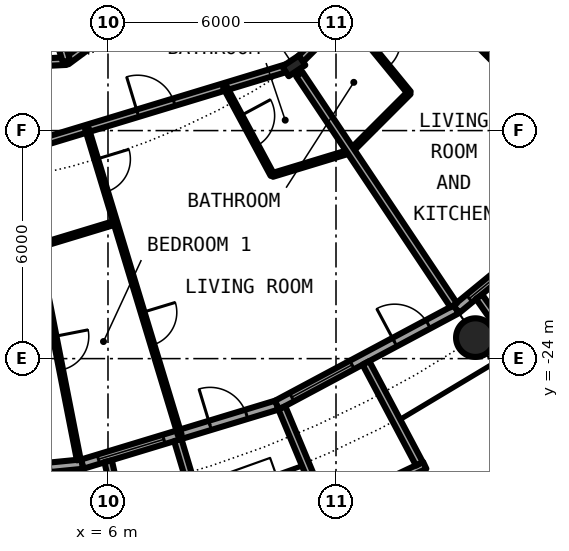
"""IFC4 building model, lengths in metres.
Left out: names, types, materials, properties, quantities, classifications, styles, units other than length and angle.
Written with IfcOpenShell. Run it as: python <this file> out.ifc"""

import sys

from ifc_helpers import new_model, si_unit, direction, frame, frame_2d, origin, origin_2d, place, context, subcontext, project, spatial, rectangle, circle, hollow_circle, i_section, extrude, element, fill, save


model = new_model("IFC4")
c1 = context("Model", 3, precision=1e-05, world=origin(), true_north=direction((0.0, 1.0)))
c2 = subcontext(c1, "Body", "Model", "MODEL_VIEW")
j1 = project(units=[si_unit("LENGTHUNIT", "METRE"), si_unit("PLANEANGLEUNIT", "RADIAN")], contexts=[c1])
p1 = place(None, origin())
s1 = spatial("IfcSite", under=j1, at=p1, CompositionType="ELEMENT")
p2 = place(p1, origin())
s2 = spatial("IfcBuilding", under=s1, at=p2, CompositionType="ELEMENT")
p3 = place(p2, frame((0.0, 0.0, 91.05)))
s3 = spatial("IfcBuildingStorey", under=s2, at=p3, CompositionType="ELEMENT", Elevation=91.05)
p4 = place(p3, frame((15.667, -23.448, 0.0), z_axis=(0.0, 0.0, 1.0), x_axis=(1.0, 0.0, 0.0)))
e1 = element("IfcColumn", 1, at=p4, inside=s3, PredefinedType="COLUMN", context=c2, shape_type="SweptSolid", body=[
    extrude(hollow_circle(Radius=0.508, WallThickness=0.04, at=origin_2d()), origin(), (0.0, 0.0, 1.0), 3.05),
])
p5 = place(p3, frame((10.889, -16.297, 0.0), z_axis=(0.0, 0.0, 1.0), x_axis=(0.55557023302, -0.831469612303, 0.0)))
e2 = element("IfcColumn", 2, at=p5, inside=s3, PredefinedType="COLUMN", context=c2, shape_type="SweptSolid", body=[
    extrude(i_section(OverallWidth=0.306, OverallDepth=0.524, WebThickness=0.021, FlangeThickness=0.04, FilletRadius=0.027, at=origin_2d()), origin(), (0.0, 0.0, 1.0), 3.05),
])
p6 = place(p3, frame((0.0, -27.3, 0.0), z_axis=(0.0, 0.0, 1.0), x_axis=(0.995173996315, 0.098126026407, 0.0)))
e3 = element("IfcWall", 3, at=p6, inside=s3, PredefinedType="SOLIDWALL", context=c2, shape_type="SweptSolid", body=[
    extrude(rectangle(XDim=5.352, YDim=0.25, at=frame_2d((2.676, 0.0))), origin(), (0.0, 0.0, 1.0), 2.7),
])
p7 = place(p6, frame((0.441, 0.0, 0.3)))
e4 = element("IfcOpeningElement", 4, at=p7, cuts=e3, PredefinedType="OPENING", context=c2, shape_type="SweptSolid", body=[
    extrude(rectangle(XDim=1.8, YDim=2.1, at=frame_2d((0.9, 1.05))), frame((0.0, 0.135, 0.0), z_axis=(0.0, -1.0, 0.0), x_axis=(1.0, 0.0, 0.0)), (0.0, 0.0, 1.0), 0.27),
])
p8 = place(p6, frame((3.51, 0.0, 0.0)))
e5 = element("IfcOpeningElement", 5, at=p8, cuts=e3, PredefinedType="OPENING", context=c2, shape_type="SweptSolid", body=[
    extrude(rectangle(XDim=1.0, YDim=2.2, at=frame_2d((0.5, 1.1))), frame((0.0, 0.135, 0.0), z_axis=(0.0, -1.0, 0.0), x_axis=(1.0, 0.0, 0.0)), (0.0, 0.0, 1.0), 0.27),
])
p9 = place(p3, frame((5.326, -26.775, 0.0), z_axis=(0.0, 0.0, 1.0), x_axis=(0.956965678721, 0.290201119486, 0.0)))
e6 = element("IfcWall", 6, at=p9, inside=s3, PredefinedType="SOLIDWALL", context=c2, shape_type="SweptSolid", body=[
    extrude(rectangle(XDim=5.351, YDim=0.25, at=frame_2d((2.676, 0.0))), origin(), (0.0, 0.0, 1.0), 2.7),
])
p10 = place(p9, frame((0.441, 0.0, 0.3)))
e7 = element("IfcOpeningElement", 7, at=p10, cuts=e6, PredefinedType="OPENING", context=c2, shape_type="SweptSolid", body=[
    extrude(rectangle(XDim=1.8, YDim=2.1, at=frame_2d((0.9, 1.05))), frame((0.0, 0.135, 0.0), z_axis=(0.0, -1.0, 0.0), x_axis=(1.0, 0.0, 0.0)), (0.0, 0.0, 1.0), 0.27),
])
p11 = place(p9, frame((3.51, 0.0, 0.0)))
e8 = element("IfcOpeningElement", 8, at=p11, cuts=e6, PredefinedType="OPENING", context=c2, shape_type="SweptSolid", body=[
    extrude(rectangle(XDim=1.0, YDim=2.2, at=frame_2d((0.5, 1.1))), frame((0.0, 0.135, 0.0), z_axis=(0.0, -1.0, 0.0), x_axis=(1.0, 0.0, 0.0)), (0.0, 0.0, 1.0), 0.27),
])
p12 = place(p3, frame((6.004, -26.7, -0.03), z_axis=(0.0, 0.0, 1.0), x_axis=(0.219609259383, -0.975587911566, 0.0)))
e9 = element("IfcWall", 9, at=p12, inside=s3, PredefinedType="SOLIDWALL", context=c2, shape_type="SweptSolid", body=[
    extrude(rectangle(XDim=2.933, YDim=0.2, at=frame_2d((1.466, 0.0))), origin(), (0.0, 0.0, 1.0), 2.73),
])
p13 = place(p3, frame((7.837, -26.144, -0.03), z_axis=(0.0, 0.0, 1.0), x_axis=(0.287064767992, -0.957911174889, 0.0)))
e10 = element("IfcWall", 10, at=p13, inside=s3, PredefinedType="SOLIDWALL", context=c2, shape_type="SweptSolid", body=[
    extrude(rectangle(XDim=3.006, YDim=0.2, at=frame_2d((1.503, 0.0))), origin(), (0.0, 0.0, 1.0), 2.73),
])
p14 = place(p3, frame((10.447, -25.222, 0.0), z_axis=(0.0, 0.0, 1.0), x_axis=(0.881915646801, 0.471407246368, 0.0)))
e11 = element("IfcWall", 11, at=p14, inside=s3, PredefinedType="SOLIDWALL", context=c2, shape_type="SweptSolid", body=[
    extrude(rectangle(XDim=5.352, YDim=0.25, at=frame_2d((2.676, 0.0))), origin(), (0.0, 0.0, 1.0), 2.7),
])
p15 = place(p14, frame((0.441, 0.0, 0.3)))
e12 = element("IfcOpeningElement", 12, at=p15, cuts=e11, PredefinedType="OPENING", context=c2, shape_type="SweptSolid", body=[
    extrude(rectangle(XDim=1.8, YDim=2.1, at=frame_2d((0.9, 1.05))), frame((0.0, 0.135, 0.0), z_axis=(0.0, -1.0, 0.0), x_axis=(1.0, 0.0, 0.0)), (0.0, 0.0, 1.0), 0.27),
])
p16 = place(p14, frame((3.51, 0.0, 0.0)))
e13 = element("IfcOpeningElement", 13, at=p16, cuts=e11, PredefinedType="OPENING", context=c2, shape_type="SweptSolid", body=[
    extrude(rectangle(XDim=1.0, YDim=2.2, at=frame_2d((0.5, 1.1))), frame((0.0, 0.135, 0.0), z_axis=(0.0, -1.0, 0.0), x_axis=(1.0, 0.0, 0.0)), (0.0, 0.0, 1.0), 0.27),
])
p17 = place(p3, frame((11.629, -28.088, -0.03), z_axis=(0.0, 0.0, 1.0), x_axis=(0.904000060331, 0.427532327342, 0.0)))
e14 = element("IfcWall", 14, at=p17, inside=s3, PredefinedType="SOLIDWALL", context=c2, shape_type="SweptSolid", body=[
    extrude(rectangle(XDim=2.993, YDim=0.2, at=frame_2d((1.497, 0.0))), origin(), (0.0, 0.0, 1.0), 2.73),
])
p18 = place(p17, frame((0.457, 0.0, 0.33)))
e15 = element("IfcOpeningElement", 15, at=p18, cuts=e14, PredefinedType="OPENING", context=c2, shape_type="SweptSolid", body=[
    extrude(circle(Radius=1.04, at=frame_2d((1.04, 1.04))), frame((0.0, 0.11, 0.0), z_axis=(0.0, -1.0, 0.0), x_axis=(1.0, 0.0, 0.0)), (0.0, 0.0, 1.0), 0.22),
])
p19 = place(p3, frame((10.575, -25.295, -0.03), z_axis=(0.0, 0.0, 1.0), x_axis=(0.385697364644, -0.922625353492, 0.0)))
e16 = element("IfcWall", 16, at=p19, inside=s3, PredefinedType="SOLIDWALL", context=c2, shape_type="SweptSolid", body=[
    extrude(rectangle(XDim=2.883, YDim=0.2, at=frame_2d((1.442, 0.0))), origin(), (0.0, 0.0, 1.0), 2.73),
])
p20 = place(p3, frame((12.787, -24.113, -0.03), z_axis=(0.0, 0.0, 1.0), x_axis=(0.468365282436, -0.883534924159, 0.0)))
e17 = element("IfcWall", 17, at=p20, inside=s3, PredefinedType="SOLIDWALL", context=c2, shape_type="SweptSolid", body=[
    extrude(rectangle(XDim=3.006, YDim=0.2, at=frame_2d((1.503, 0.0))), origin(), (0.0, 0.0, 1.0), 2.73),
])
p21 = place(p3, frame((15.167, -22.699, 0.0), z_axis=(0.0, 0.0, 1.0), x_axis=(0.773019449054, 0.634382322723, 0.0)))
e18 = element("IfcWall", 18, at=p21, inside=s3, PredefinedType="SOLIDWALL", context=c2, shape_type="SweptSolid", body=[
    extrude(rectangle(XDim=5.352, YDim=0.25, at=frame_2d((2.676, 0.0))), origin(), (0.0, 0.0, 1.0), 2.7),
])
p22 = place(p21, frame((0.441, 0.0, 0.3)))
e19 = element("IfcOpeningElement", 19, at=p22, cuts=e18, PredefinedType="OPENING", context=c2, shape_type="SweptSolid", body=[
    extrude(rectangle(XDim=1.8, YDim=2.1, at=frame_2d((0.9, 1.05))), frame((0.0, 0.135, 0.0), z_axis=(0.0, -1.0, 0.0), x_axis=(1.0, 0.0, 0.0)), (0.0, 0.0, 1.0), 0.27),
])
p23 = place(p21, frame((3.51, 0.0, 0.0)))
e20 = element("IfcOpeningElement", 20, at=p23, cuts=e18, PredefinedType="OPENING", context=c2, shape_type="SweptSolid", body=[
    extrude(rectangle(XDim=1.0, YDim=2.2, at=frame_2d((0.5, 1.1))), frame((0.0, 0.135, 0.0), z_axis=(0.0, -1.0, 0.0), x_axis=(1.0, 0.0, 0.0)), (0.0, 0.0, 1.0), 0.27),
])
p24 = place(p3, frame((15.765, -22.37, -0.03), z_axis=(0.0, 0.0, 1.0), x_axis=(0.576274612209, -0.817256123454, 0.0)))
e21 = element("IfcWall", 21, at=p24, inside=s3, PredefinedType="SOLIDWALL", context=c2, shape_type="SweptSolid", body=[
    extrude(rectangle(XDim=2.933, YDim=0.2, at=frame_2d((1.466, 0.0))), origin(), (0.0, 0.0, 1.0), 2.73),
])
p25 = place(p3, frame((12.389, -18.542, 0.0), z_axis=(0.0, 0.0, 1.0), x_axis=(0.707106781187, 0.707106781187, 0.0)))
e22 = element("IfcWall", 22, at=p25, inside=s3, PredefinedType="PARTITIONING", context=c2, shape_type="SweptSolid", body=[
    extrude(rectangle(XDim=2.175, YDim=0.1, at=frame_2d((1.088, 0.0))), origin(), (0.0, 0.0, 1.0), 2.7),
])
p26 = place(p3, frame((0.0, -22.3, 0.0), z_axis=(0.0, 0.0, 1.0), x_axis=(0.956940987612, 0.290282528286, 0.0)))
e23 = element("IfcWall", 23, at=p26, inside=s3, PredefinedType="PARTITIONING", context=c2, shape_type="SweptSolid", body=[
    extrude(rectangle(XDim=6.477, YDim=0.1, at=frame_2d((3.238, 0.0))), origin(), (0.0, 0.0, 1.0), 2.7),
])
p27 = place(p3, frame((10.327, -19.168, 0.0), z_axis=(0.0, 0.0, 1.0), x_axis=(0.956877769253, 0.290490851335, 0.0)))
e24 = element("IfcWall", 24, at=p27, inside=s3, PredefinedType="PARTITIONING", context=c2, shape_type="SweptSolid", body=[
    extrude(rectangle(XDim=2.158, YDim=0.1, at=frame_2d((1.079, 0.0))), origin(), (0.0, 0.0, 1.0), 2.7),
])
p28 = place(p3, frame((11.0, -16.186, 0.0), z_axis=(0.0, 0.0, 1.0), x_axis=(0.707106781187, 0.707106781187, 0.0)))
e25 = element("IfcWall", 25, at=p28, inside=s3, PredefinedType="PARTITIONING", context=c2, shape_type="SweptSolid", body=[
    extrude(rectangle(XDim=7.334, YDim=0.2, at=frame_2d((3.667, 0.0))), origin(), (0.0, 0.0, 1.0), 2.38),
])
p29 = place(p28, frame((4.123, 0.0, 0.0)))
e26 = element("IfcOpeningElement", 26, at=p29, cuts=e25, PredefinedType="OPENING", context=c2, shape_type="SweptSolid", body=[
    extrude(rectangle(XDim=1.0, YDim=2.3, at=frame_2d((0.5, 1.15))), frame((0.0, 0.11, 0.0), z_axis=(0.0, -1.0, 0.0), x_axis=(1.0, 0.0, 0.0)), (0.0, 0.0, 1.0), 0.22),
])
p30 = place(p3, frame((0.0, -19.6, 0.0), z_axis=(0.0, 0.0, 1.0), x_axis=(0.956932298225, 0.290311172044, 0.0)))
e27 = element("IfcWall", 27, at=p30, inside=s3, PredefinedType="PARTITIONING", context=c2, shape_type="SweptSolid", body=[
    extrude(rectangle(XDim=11.219, YDim=0.2, at=frame_2d((5.61, 0.0))), origin(), (0.0, 0.0, 1.0), 2.38),
])
p31 = place(p30, frame((7.086, 0.0, 0.0)))
e28 = element("IfcOpeningElement", 28, at=p31, cuts=e27, PredefinedType="OPENING", context=c2, shape_type="SweptSolid", body=[
    extrude(rectangle(XDim=1.0, YDim=2.3, at=frame_2d((0.5, 1.15))), frame((0.0, 0.11, 0.0), z_axis=(0.0, -1.0, 0.0), x_axis=(1.0, 0.0, 0.0)), (0.0, 0.0, 1.0), 0.22),
])
p32 = place(p3, frame((-3.297, -16.575, 0.0), z_axis=(0.0, 0.0, 1.0), x_axis=(0.998796706656, 0.0490422142, 0.0)))
e29 = element("IfcWall", 29, at=p32, inside=s3, PredefinedType="PARTITIONING", context=c2, shape_type="SweptSolid", body=[
    extrude(rectangle(XDim=8.214, YDim=0.2, at=frame_2d((4.107, 0.0))), origin(), (0.0, 0.0, 1.0), 2.7),
])
p33 = place(p32, frame((3.614, 0.0, 0.0)))
e30 = element("IfcOpeningElement", 30, at=p33, cuts=e29, PredefinedType="OPENING", context=c2, shape_type="SweptSolid", body=[
    extrude(rectangle(XDim=1.0, YDim=2.3, at=frame_2d((0.5, 1.15))), frame((0.0, 0.11, 0.0), z_axis=(0.0, -1.0, 0.0), x_axis=(1.0, 0.0, 0.0)), (0.0, 0.0, 1.0), 0.22),
])
p34 = place(p3, frame((4.906, -16.172, 0.0), z_axis=(0.0, 0.0, 1.0), x_axis=(0.803191461888, 0.595720971219, 0.0)))
e31 = element("IfcWall", 31, at=p34, inside=s3, PredefinedType="PARTITIONING", context=c2, shape_type="SweptSolid", body=[
    extrude(rectangle(XDim=9.76, YDim=0.2, at=frame_2d((4.88, 0.0))), origin(), (0.0, 0.0, 1.0), 2.7),
])
p35 = place(p34, frame((4.38, 0.0, 0.0)))
e32 = element("IfcOpeningElement", 32, at=p35, cuts=e31, PredefinedType="OPENING", context=c2, shape_type="SweptSolid", body=[
    extrude(rectangle(XDim=1.0, YDim=2.3, at=frame_2d((0.5, 1.15))), frame((0.0, 0.11, 0.0), z_axis=(0.0, -1.0, 0.0), x_axis=(1.0, 0.0, 0.0)), (0.0, 0.0, 1.0), 0.22),
])
p36 = place(p3, frame((2.242, -7.388, 0.0), z_axis=(0.0, 0.0, 1.0), x_axis=(0.290225889812, -0.956958166736, 0.0)))
e33 = element("IfcWall", 33, at=p36, inside=s3, PredefinedType="PARTITIONING", context=c2, shape_type="SweptSolid", body=[
    extrude(rectangle(XDim=9.179, YDim=0.2, at=frame_2d((4.59, 0.0))), origin(), (0.0, 0.0, 1.0), 2.7),
])
p37 = place(p3, frame((4.13, -21.047, 0.0), z_axis=(0.0, 0.0, 1.0), x_axis=(0.192433779325, -0.981309961518, 0.0)))
e34 = element("IfcWall", 34, at=p37, inside=s3, PredefinedType="PARTITIONING", context=c2, shape_type="SweptSolid", body=[
    extrude(rectangle(XDim=5.727, YDim=0.1, at=frame_2d((2.863, 0.0))), origin(), (0.0, 0.0, 1.0), 2.7),
])
p38 = place(p37, frame((2.414, 0.0, 0.0)))
e35 = element("IfcOpeningElement", 35, at=p38, cuts=e34, PredefinedType="OPENING", context=c2, shape_type="SweptSolid", body=[
    extrude(rectangle(XDim=0.9, YDim=2.3, at=frame_2d((0.45, 1.15))), frame((0.0, 0.06, 0.0), z_axis=(0.0, -1.0, 0.0), x_axis=(1.0, 0.0, 0.0)), (0.0, 0.0, 1.0), 0.12),
])
p39 = place(p3, frame((5.445, -17.948, 0.0), z_axis=(0.0, 0.0, 1.0), x_axis=(0.290158700753, -0.956978541231, 0.0)))
e36 = element("IfcWall", 36, at=p39, inside=s3, PredefinedType="PARTITIONING", context=c2, shape_type="SweptSolid", body=[
    extrude(rectangle(XDim=8.419, YDim=0.1, at=frame_2d((4.209, 0.0))), origin(), (0.0, 0.0, 1.0), 2.7),
])
p40 = place(p39, frame((0.842, 0.0, 0.0)))
e37 = element("IfcOpeningElement", 37, at=p40, cuts=e36, PredefinedType="OPENING", context=c2, shape_type="SweptSolid", body=[
    extrude(rectangle(XDim=0.9, YDim=2.3, at=frame_2d((0.45, 1.15))), frame((0.0, 0.06, 0.0), z_axis=(0.0, -1.0, 0.0), x_axis=(1.0, 0.0, 0.0)), (0.0, 0.0, 1.0), 0.12),
])
p41 = place(p39, frame((5.052, 0.0, 0.0)))
e38 = element("IfcOpeningElement", 38, at=p41, cuts=e36, PredefinedType="OPENING", context=c2, shape_type="SweptSolid", body=[
    extrude(rectangle(XDim=0.9, YDim=2.3, at=frame_2d((0.45, 1.15))), frame((0.0, 0.06, 0.0), z_axis=(0.0, -1.0, 0.0), x_axis=(1.0, 0.0, 0.0)), (0.0, 0.0, 1.0), 0.12),
])
p42 = place(p3, frame((9.074, -16.847, 0.0), z_axis=(0.0, 0.0, 1.0), x_axis=(0.474160570331, -0.880438387136, 0.0)))
e39 = element("IfcWall", 39, at=p42, inside=s3, PredefinedType="PARTITIONING", context=c2, shape_type="SweptSolid", body=[
    extrude(rectangle(XDim=2.636, YDim=0.1, at=frame_2d((1.318, 0.0))), origin(), (0.0, 0.0, 1.0), 2.7),
])
p43 = place(p42, frame((0.868, 0.0, 0.0)))
e40 = element("IfcOpeningElement", 40, at=p43, cuts=e39, PredefinedType="OPENING", context=c2, shape_type="SweptSolid", body=[
    extrude(rectangle(XDim=0.9, YDim=2.3, at=frame_2d((0.45, 1.15))), frame((0.0, 0.06, 0.0), z_axis=(0.0, -1.0, 0.0), x_axis=(1.0, 0.0, 0.0)), (0.0, 0.0, 1.0), 0.12),
])
p44 = place(p3, frame((11.034, -16.515, 0.0), z_axis=(0.0, 0.0, 1.0), x_axis=(0.555701298605, -0.831382022135, 0.0)))
e41 = element("IfcWall", 41, at=p44, inside=s3, PredefinedType="PARTITIONING", context=c2, shape_type="SweptSolid", body=[
    extrude(rectangle(XDim=7.313, YDim=0.2, at=frame_2d((3.657, 0.0))), origin(), (0.0, 0.0, 1.0), 2.7),
])
p45 = place(p3, frame((12.241, -14.945, 0.0), z_axis=(0.0, 0.0, 1.0), x_axis=(0.633582447834, -0.77367517848, 0.0)))
e42 = element("IfcWall", 42, at=p45, inside=s3, PredefinedType="PARTITIONING", context=c2, shape_type="SweptSolid", body=[
    extrude(rectangle(XDim=2.661, YDim=0.1, at=frame_2d((1.331, 0.0))), origin(), (0.0, 0.0, 1.0), 2.7),
])
p46 = place(p45, frame((0.881, 0.0, 0.0)))
e43 = element("IfcOpeningElement", 43, at=p46, cuts=e42, PredefinedType="OPENING", context=c2, shape_type="SweptSolid", body=[
    extrude(rectangle(XDim=0.9, YDim=2.3, at=frame_2d((0.45, 1.15))), frame((0.0, 0.06, 0.0), z_axis=(0.0, -1.0, 0.0), x_axis=(1.0, 0.0, 0.0)), (0.0, 0.0, 1.0), 0.12),
])
p47 = place(p3, frame((15.465, -15.465, 0.0), z_axis=(0.0, 0.0, 1.0), x_axis=(0.707106781187, -0.707106781187, 0.0)))
e44 = element("IfcWall", 44, at=p47, inside=s3, PredefinedType="PARTITIONING", context=c2, shape_type="SweptSolid", body=[
    extrude(rectangle(XDim=5.305, YDim=0.1, at=frame_2d((2.652, 0.0))), origin(), (0.0, 0.0, 1.0), 2.7),
])
p48 = place(p47, frame((2.202, 0.0, 0.0)))
e45 = element("IfcOpeningElement", 45, at=p48, cuts=e44, PredefinedType="OPENING", context=c2, shape_type="SweptSolid", body=[
    extrude(rectangle(XDim=0.9, YDim=2.3, at=frame_2d((0.45, 1.15))), frame((0.0, 0.06, 0.0), z_axis=(0.0, -1.0, 0.0), x_axis=(1.0, 0.0, 0.0)), (0.0, 0.0, 1.0), 0.12),
])
p49 = place(p10, origin())
e46 = element("IfcWindow", 46, at=p49, inside=s3, PartitioningType="SINGLE_PANEL", PredefinedType="WINDOW", context=c2, shape_type="SweptSolid", body=[
    extrude(rectangle(XDim=1.8, YDim=2.1, at=frame_2d((0.9, 1.05))), frame((0.0, 0.03, 0.0), z_axis=(0.0, -1.0, 0.0), x_axis=(1.0, 0.0, 0.0)), (0.0, 0.0, 1.0), 0.06),
])
fill(e7, e46)
p50 = place(p11, origin())
e47 = element("IfcDoor", 47, at=p50, inside=s3, OperationType="SINGLE_SWING_LEFT", PredefinedType="DOOR", context=c2, shape_type="SweptSolid", body=[
    extrude(rectangle(XDim=1.0, YDim=2.2, at=frame_2d((0.5, 1.1))), frame((0.0, 0.025, 0.0), z_axis=(0.0, -1.0, 0.0), x_axis=(1.0, 0.0, 0.0)), (0.0, 0.0, 1.0), 0.05),
])
fill(e8, e47)
p51 = place(p15, origin())
e48 = element("IfcWindow", 48, at=p51, inside=s3, PartitioningType="SINGLE_PANEL", PredefinedType="WINDOW", context=c2, shape_type="SweptSolid", body=[
    extrude(rectangle(XDim=1.8, YDim=2.1, at=frame_2d((0.9, 1.05))), frame((0.0, 0.03, 0.0), z_axis=(0.0, -1.0, 0.0), x_axis=(1.0, 0.0, 0.0)), (0.0, 0.0, 1.0), 0.06),
])
fill(e12, e48)
p52 = place(p18, origin())
e49 = element("IfcWindow", 49, at=p52, inside=s3, PartitioningType="SINGLE_PANEL", PredefinedType="WINDOW", context=c2, shape_type="SweptSolid", body=[
    extrude(circle(Radius=1.04, at=frame_2d((1.04, 1.04))), frame((0.0, 0.03, 0.0), z_axis=(0.0, -1.0, 0.0), x_axis=(1.0, 0.0, 0.0)), (0.0, 0.0, 1.0), 0.06),
])
fill(e15, e49)
p53 = place(p16, origin())
e50 = element("IfcDoor", 50, at=p53, inside=s3, OperationType="SINGLE_SWING_LEFT", PredefinedType="DOOR", context=c2, shape_type="SweptSolid", body=[
    extrude(rectangle(XDim=1.0, YDim=2.2, at=frame_2d((0.5, 1.1))), frame((0.0, 0.025, 0.0), z_axis=(0.0, -1.0, 0.0), x_axis=(1.0, 0.0, 0.0)), (0.0, 0.0, 1.0), 0.05),
])
fill(e13, e50)
p54 = place(p22, origin())
e51 = element("IfcWindow", 51, at=p54, inside=s3, PartitioningType="SINGLE_PANEL", PredefinedType="WINDOW", context=c2, shape_type="SweptSolid", body=[
    extrude(rectangle(XDim=1.8, YDim=2.1, at=frame_2d((0.9, 1.05))), frame((0.0, 0.03, 0.0), z_axis=(0.0, -1.0, 0.0), x_axis=(1.0, 0.0, 0.0)), (0.0, 0.0, 1.0), 0.06),
])
fill(e19, e51)
p55 = place(p31, origin())
e52 = element("IfcDoor", 52, at=p55, inside=s3, OperationType="SINGLE_SWING_RIGHT", PredefinedType="DOOR", context=c2, shape_type="SweptSolid", body=[
    extrude(rectangle(XDim=1.0, YDim=2.3, at=frame_2d((0.5, 1.15))), frame((0.0, 0.025, 0.0), z_axis=(0.0, -1.0, 0.0), x_axis=(1.0, 0.0, 0.0)), (0.0, 0.0, 1.0), 0.05),
])
fill(e28, e52)
p56 = place(p43, origin())
e53 = element("IfcDoor", 53, at=p56, inside=s3, OperationType="SINGLE_SWING_RIGHT", PredefinedType="DOOR", context=c2, shape_type="SweptSolid", body=[
    extrude(rectangle(XDim=0.9, YDim=2.3, at=frame_2d((0.45, 1.15))), frame((0.0, 0.025, 0.0), z_axis=(0.0, -1.0, 0.0), x_axis=(1.0, 0.0, 0.0)), (0.0, 0.0, 1.0), 0.05),
])
fill(e40, e53)
p57 = place(p40, origin())
e54 = element("IfcDoor", 54, at=p57, inside=s3, OperationType="SINGLE_SWING_LEFT", PredefinedType="DOOR", context=c2, shape_type="SweptSolid", body=[
    extrude(rectangle(XDim=0.9, YDim=2.3, at=frame_2d((0.45, 1.15))), frame((0.0, 0.025, 0.0), z_axis=(0.0, -1.0, 0.0), x_axis=(1.0, 0.0, 0.0)), (0.0, 0.0, 1.0), 0.05),
])
fill(e37, e54)
p58 = place(p41, origin())
e55 = element("IfcDoor", 55, at=p58, inside=s3, OperationType="SINGLE_SWING_RIGHT", PredefinedType="DOOR", context=c2, shape_type="SweptSolid", body=[
    extrude(rectangle(XDim=0.9, YDim=2.3, at=frame_2d((0.45, 1.15))), frame((0.0, 0.025, 0.0), z_axis=(0.0, -1.0, 0.0), x_axis=(1.0, 0.0, 0.0)), (0.0, 0.0, 1.0), 0.05),
])
fill(e38, e55)
p59 = place(p38, origin())
e56 = element("IfcDoor", 56, at=p59, inside=s3, OperationType="SINGLE_SWING_RIGHT", PredefinedType="DOOR", context=c2, shape_type="SweptSolid", body=[
    extrude(rectangle(XDim=0.9, YDim=2.3, at=frame_2d((0.45, 1.15))), frame((0.0, 0.025, 0.0), z_axis=(0.0, -1.0, 0.0), x_axis=(1.0, 0.0, 0.0)), (0.0, 0.0, 1.0), 0.05),
])
fill(e35, e56)
p60 = place(p46, origin())
e57 = element("IfcDoor", 57, at=p60, inside=s3, OperationType="SINGLE_SWING_LEFT", PredefinedType="DOOR", context=c2, shape_type="SweptSolid", body=[
    extrude(rectangle(XDim=0.9, YDim=2.3, at=frame_2d((0.45, 1.15))), frame((0.0, 0.025, 0.0), z_axis=(0.0, -1.0, 0.0), x_axis=(1.0, 0.0, 0.0)), (0.0, 0.0, 1.0), 0.05),
])
fill(e43, e57)
save(model, sys.argv[1])
